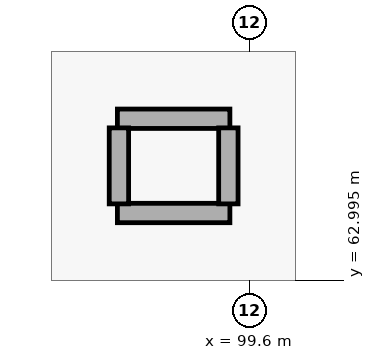
"""IFC4 building model, lengths in metres.
Left out: names, types, materials, properties, quantities, classifications, styles, units other than length and angle.
Written with IfcOpenShell. Run it as: python <this file> out.ifc"""

import sys

from ifc_helpers import new_model, si_unit, direction, frame, frame_2d, origin, place, context, subcontext, project, spatial, rectangle, extrude, element, save


model = new_model("IFC4")
c1 = context("Model", 3, precision=1e-05, world=origin(), true_north=direction((0.0, 1.0)))
c2 = subcontext(c1, "Body", "Model", "MODEL_VIEW")
j1 = project(units=[si_unit("LENGTHUNIT", "METRE"), si_unit("PLANEANGLEUNIT", "RADIAN")], contexts=[c1])
p1 = place(None, origin())
s1 = spatial("IfcSite", under=j1, at=p1, CompositionType="ELEMENT")
p2 = place(p1, origin())
s2 = spatial("IfcBuilding", under=s1, at=p2, CompositionType="ELEMENT")
p3 = place(p2, frame((0.0, 0.0, 5.4)))
s3 = spatial("IfcBuildingStorey", under=s2, at=p3, CompositionType="ELEMENT", Elevation=5.4)
for number, where, z_axis, x_axis in (
    (1, (97.86, 65.12, 0.0), (0.0, 0.0, 1.0), (1.0, 0.0, 0.0)),
    (2, (97.86, 63.88, 0.0), (0.0, 0.0, 1.0), (1.0, 0.0, 0.0)),
):
    element("IfcWall", number, at=place(p3, frame(where, z_axis=z_axis, x_axis=x_axis)), inside=s3, PredefinedType="PARTITIONING", context=c2, shape_type="SweptSolid", body=[
        extrude(rectangle(XDim=1.48, YDim=0.255, at=frame_2d((0.74, 0.0))), origin(), (0.0, 0.0, 1.0), 4.17),
    ])
p4 = place(p3, frame((97.88, 64.0, 0.0), z_axis=(0.0, 0.0, 1.0), x_axis=(0.0, 1.0, 0.0)))
e3 = element("IfcWall", 3, at=p4, inside=s3, PredefinedType="PARTITIONING", context=c2, shape_type="SweptSolid", body=[
    extrude(rectangle(XDim=1.0, YDim=0.255, at=frame_2d((0.5, 0.0))), origin(), (0.0, 0.0, 1.0), 4.72),
])
p5 = place(p3, frame((99.32, 64.0, 0.0), z_axis=(0.0, 0.0, 1.0), x_axis=(0.0, 1.0, 0.0)))
e4 = element("IfcWall", 4, at=p5, inside=s3, PredefinedType="PARTITIONING", context=c2, shape_type="SweptSolid", body=[
    extrude(rectangle(XDim=1.0, YDim=0.255, at=frame_2d((0.5, 0.0))), origin(), (0.0, 0.0, 1.0), 4.17),
])
save(model, sys.argv[1])
